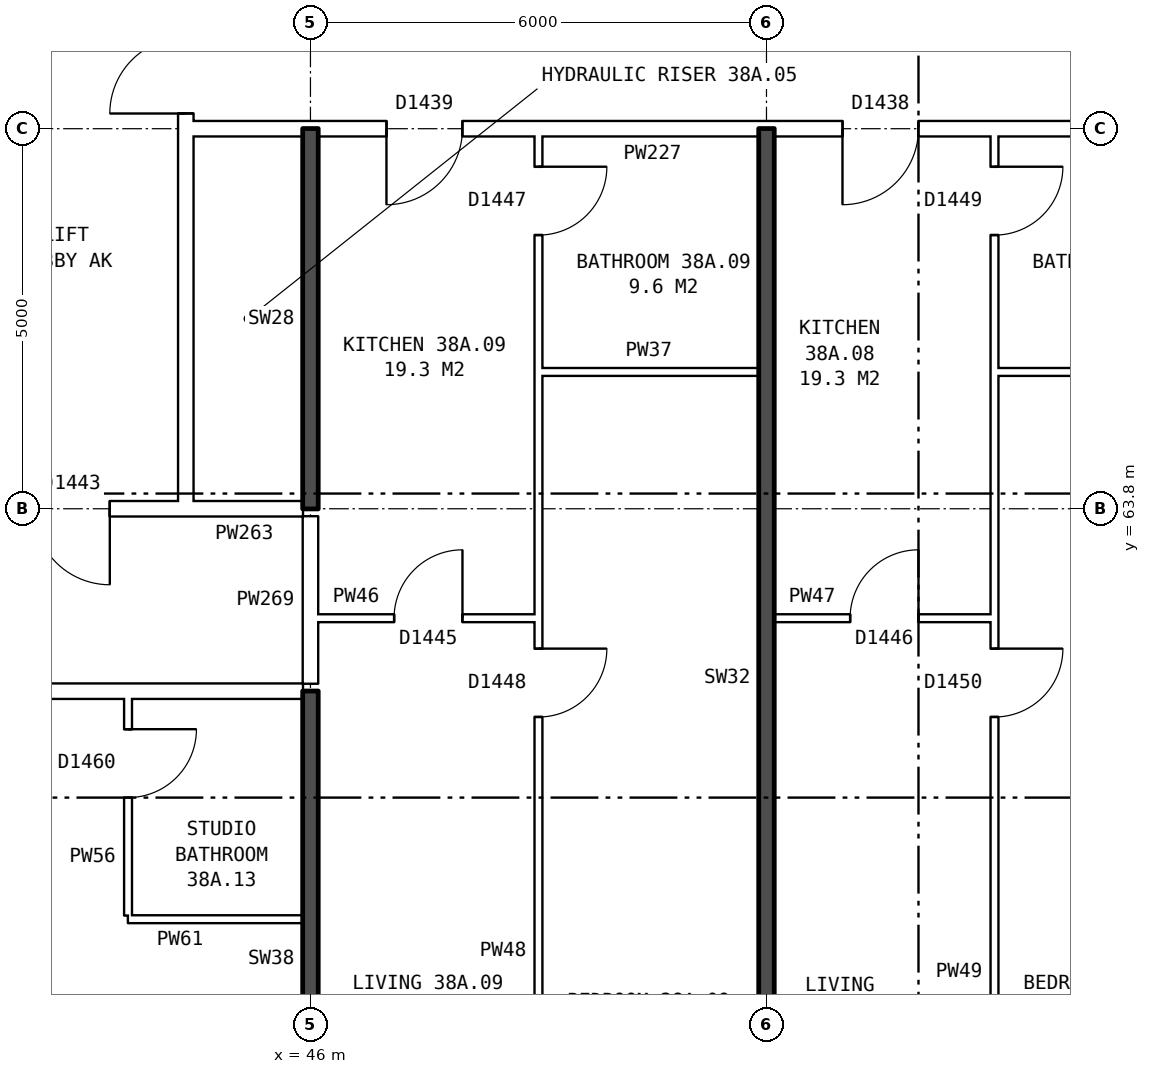
"""IFC4 building model, lengths in metres.
Left out: names, types, materials, properties, quantities, classifications, styles, units other than length and angle.
Written with IfcOpenShell. Run it as: python <this file> out.ifc"""

import sys

from ifc_helpers import new_model, si_unit, direction, frame, frame_2d, origin, place, context, subcontext, project, spatial, rectangle, extrude, element, fill, save


model = new_model("IFC4")
c1 = context("Model", 3, precision=1e-05, world=origin(), true_north=direction((0.0, 1.0)))
c2 = subcontext(c1, "Body", "Model", "MODEL_VIEW")
j1 = project(units=[si_unit("LENGTHUNIT", "METRE"), si_unit("PLANEANGLEUNIT", "RADIAN")], contexts=[c1])
p1 = place(None, origin())
s1 = spatial("IfcSite", under=j1, at=p1, CompositionType="ELEMENT")
p2 = place(p1, origin())
s2 = spatial("IfcBuilding", under=s1, at=p2, CompositionType="ELEMENT")
p3 = place(p2, frame((0.0, 0.0, 136.1)))
s3 = spatial("IfcBuildingStorey", under=s2, at=p3, CompositionType="ELEMENT", Elevation=136.1)
p4 = place(p3, frame((44.36, 63.9, 0.0), z_axis=(0.0, 0.0, 1.0), x_axis=(0.0, 1.0, 0.0)))
e1 = element("IfcWall", 1, at=p4, inside=s3, PredefinedType="PARTITIONING", context=c2, shape_type="SweptSolid", body=[
    extrude(rectangle(XDim=12.2, YDim=0.2, at=frame_2d((6.1, 0.0))), origin(), (0.0, 0.0, 1.0), 2.85),
])
p5 = place(p4, frame((5.1, 0.0, 0.0)))
e2 = element("IfcOpeningElement", 2, at=p5, cuts=e1, PredefinedType="OPENING", context=c2, shape_type="SweptSolid", body=[
    extrude(rectangle(XDim=2.0, YDim=2.1, at=frame_2d((1.0, 1.05))), frame((0.0, 0.11, 0.0), z_axis=(0.0, -1.0, 0.0), x_axis=(1.0, 0.0, 0.0)), (0.0, 0.0, 1.0), 0.22),
])
p6 = place(p3, frame((43.6, 58.4, 0.0), z_axis=(0.0, 0.0, 1.0), x_axis=(1.0, 0.0, 0.0)))
e3 = element("IfcWall", 3, at=p6, inside=s3, PredefinedType="PARTITIONING", context=c2, shape_type="SweptSolid", body=[
    extrude(rectangle(XDim=2.3, YDim=0.1, at=frame_2d((1.15, 0.0))), origin(), (0.0, 0.0, 1.0), 2.85),
])
p7 = place(p3, frame((27.11, 61.4, 0.0), z_axis=(0.0, 0.0, 1.0), x_axis=(1.0, 0.0, 0.0)))
e4 = element("IfcWall", 4, at=p7, inside=s3, PredefinedType="PARTITIONING", context=c2, shape_type="SweptSolid", body=[
    extrude(rectangle(XDim=18.79, YDim=0.2, at=frame_2d((9.395, 0.0))), origin(), (0.0, 0.0, 1.0), 2.85),
])
p8 = place(p7, frame((14.19, 0.0, 0.0)))
e5 = element("IfcOpeningElement", 5, at=p8, cuts=e4, PredefinedType="OPENING", context=c2, shape_type="SweptSolid", body=[
    extrude(rectangle(XDim=1.0, YDim=2.1, at=frame_2d((0.5, 1.05))), frame((0.0, 0.11, 0.0), z_axis=(0.0, -1.0, 0.0), x_axis=(1.0, 0.0, 0.0)), (0.0, 0.0, 1.0), 0.22),
])
p9 = place(p7, frame((8.19, 0.0, 0.0)))
e6 = element("IfcOpeningElement", 6, at=p9, cuts=e4, PredefinedType="OPENING", context=c2, shape_type="SweptSolid", body=[
    extrude(rectangle(XDim=1.0, YDim=2.1, at=frame_2d((0.5, 1.05))), frame((0.0, 0.11, 0.0), z_axis=(0.0, -1.0, 0.0), x_axis=(1.0, 0.0, 0.0)), (0.0, 0.0, 1.0), 0.22),
])
p10 = place(p7, frame((4.59, 0.0, 0.0)))
e7 = element("IfcOpeningElement", 7, at=p10, cuts=e4, PredefinedType="OPENING", context=c2, shape_type="SweptSolid", body=[
    extrude(rectangle(XDim=1.0, YDim=2.1, at=frame_2d((0.5, 1.05))), frame((0.0, 0.11, 0.0), z_axis=(0.0, -1.0, 0.0), x_axis=(1.0, 0.0, 0.0)), (0.0, 0.0, 1.0), 0.22),
])
p11 = place(p3, frame((46.1, 62.36, 0.0), z_axis=(0.0, 0.0, 1.0), x_axis=(1.0, 0.0, 0.0)))
e8 = element("IfcWall", 8, at=p11, inside=s3, PredefinedType="PARTITIONING", context=c2, shape_type="SweptSolid", body=[
    extrude(rectangle(XDim=2.9, YDim=0.1, at=frame_2d((1.45, 0.0))), origin(), (0.0, 0.0, 1.0), 2.85),
])
p12 = place(p11, frame((1.0, 0.0, 0.0)))
e9 = element("IfcOpeningElement", 9, at=p12, cuts=e8, PredefinedType="OPENING", context=c2, shape_type="SweptSolid", body=[
    extrude(rectangle(XDim=0.9, YDim=2.1, at=frame_2d((0.45, 1.05))), frame((0.0, 0.06, 0.0), z_axis=(0.0, -1.0, 0.0), x_axis=(1.0, 0.0, 0.0)), (0.0, 0.0, 1.0), 0.12),
])
p13 = place(p3, frame((52.1, 62.36, 0.0), z_axis=(0.0, 0.0, 1.0), x_axis=(1.0, 0.0, 0.0)))
e10 = element("IfcWall", 10, at=p13, inside=s3, PredefinedType="PARTITIONING", context=c2, shape_type="SweptSolid", body=[
    extrude(rectangle(XDim=2.9, YDim=0.1, at=frame_2d((1.45, 0.0))), origin(), (0.0, 0.0, 1.0), 2.85),
])
p14 = place(p13, frame((1.0, 0.0, 0.0)))
e11 = element("IfcOpeningElement", 11, at=p14, cuts=e10, PredefinedType="OPENING", context=c2, shape_type="SweptSolid", body=[
    extrude(rectangle(XDim=0.9, YDim=2.1, at=frame_2d((0.45, 1.05))), frame((0.0, 0.06, 0.0), z_axis=(0.0, -1.0, 0.0), x_axis=(1.0, 0.0, 0.0)), (0.0, 0.0, 1.0), 0.12),
])
p15 = place(p3, frame((41.36, 63.8, 0.0), z_axis=(0.0, 0.0, 1.0), x_axis=(1.0, 0.0, 0.0)))
e12 = element("IfcWall", 12, at=p15, inside=s3, PredefinedType="PARTITIONING", context=c2, shape_type="SweptSolid", body=[
    extrude(rectangle(XDim=3.0, YDim=0.2, at=frame_2d((1.5, 0.0))), origin(), (0.0, 0.0, 1.0), 2.85),
])
p16 = place(p15, frame((1.0, 0.0, 0.0)))
e13 = element("IfcOpeningElement", 13, at=p16, cuts=e12, PredefinedType="OPENING", context=c2, shape_type="SweptSolid", body=[
    extrude(rectangle(XDim=1.0, YDim=2.1, at=frame_2d((0.5, 1.05))), frame((0.0, 0.11, 0.0), z_axis=(0.0, -1.0, 0.0), x_axis=(1.0, 0.0, 0.0)), (0.0, 0.0, 1.0), 0.22),
])
p17 = place(p3, frame((44.36, 63.8, 0.0), z_axis=(0.0, 0.0, 1.0), x_axis=(1.0, 0.0, 0.0)))
e14 = element("IfcWall", 14, at=p17, inside=s3, PredefinedType="PARTITIONING", context=c2, shape_type="SweptSolid", body=[
    extrude(rectangle(XDim=1.54, YDim=0.2, at=frame_2d((0.77, 0.0))), origin(), (0.0, 0.0, 1.0), 2.85),
])
for number, where, z_axis, x_axis in (
    (15, (49.0, 65.6, 0.0), (0.0, 0.0, 1.0), (1.0, 0.0, 0.0)),
    (16, (55.0, 65.6, 0.0), (0.0, 0.0, 1.0), (1.0, 0.0, 0.0)),
):
    element("IfcWall", number, at=place(p3, frame(where, z_axis=z_axis, x_axis=x_axis)), inside=s3, PredefinedType="PARTITIONING", context=c2, shape_type="SweptSolid", body=[
        extrude(rectangle(XDim=2.9, YDim=0.1, at=frame_2d((1.45, 0.0))), origin(), (0.0, 0.0, 1.0), 2.85),
    ])
p18 = place(p3, frame((44.36, 68.8, 0.0), z_axis=(0.0, 0.0, 1.0), x_axis=(1.0, 0.0, 0.0)))
e17 = element("IfcWall", 17, at=p18, inside=s3, PredefinedType="PARTITIONING", context=c2, shape_type="SweptSolid", body=[
    extrude(rectangle(XDim=19.28, YDim=0.2, at=frame_2d((9.64, 0.0))), origin(), (0.0, 0.0, 1.0), 2.85),
])
p19 = place(p18, frame((14.64, 0.0, 0.0)))
e18 = element("IfcOpeningElement", 18, at=p19, cuts=e17, PredefinedType="OPENING", context=c2, shape_type="SweptSolid", body=[
    extrude(rectangle(XDim=1.0, YDim=2.1, at=frame_2d((0.5, 1.05))), frame((0.0, 0.11, 0.0), z_axis=(0.0, -1.0, 0.0), x_axis=(1.0, 0.0, 0.0)), (0.0, 0.0, 1.0), 0.22),
])
p20 = place(p18, frame((8.64, 0.0, 0.0)))
e19 = element("IfcOpeningElement", 19, at=p20, cuts=e17, PredefinedType="OPENING", context=c2, shape_type="SweptSolid", body=[
    extrude(rectangle(XDim=1.0, YDim=2.1, at=frame_2d((0.5, 1.05))), frame((0.0, 0.11, 0.0), z_axis=(0.0, -1.0, 0.0), x_axis=(1.0, 0.0, 0.0)), (0.0, 0.0, 1.0), 0.22),
])
p21 = place(p18, frame((2.64, 0.0, 0.0)))
e20 = element("IfcOpeningElement", 20, at=p21, cuts=e17, PredefinedType="OPENING", context=c2, shape_type="SweptSolid", body=[
    extrude(rectangle(XDim=1.0, YDim=2.1, at=frame_2d((0.5, 1.05))), frame((0.0, 0.11, 0.0), z_axis=(0.0, -1.0, 0.0), x_axis=(1.0, 0.0, 0.0)), (0.0, 0.0, 1.0), 0.22),
])
p22 = place(p3, frame((43.6, 58.45, 0.0), z_axis=(0.0, 0.0, 1.0), x_axis=(0.0, 1.0, 0.0)))
e21 = element("IfcWall", 21, at=p22, inside=s3, PredefinedType="PARTITIONING", context=c2, shape_type="SweptSolid", body=[
    extrude(rectangle(XDim=2.85, YDim=0.1, at=frame_2d((1.425, 0.0))), origin(), (0.0, 0.0, 1.0), 2.85),
])
p23 = place(p22, frame((1.55, 0.0, 0.0)))
e22 = element("IfcOpeningElement", 22, at=p23, cuts=e21, PredefinedType="OPENING", context=c2, shape_type="SweptSolid", body=[
    extrude(rectangle(XDim=0.9, YDim=2.1, at=frame_2d((0.45, 1.05))), frame((0.0, 0.06, 0.0), z_axis=(0.0, -1.0, 0.0), x_axis=(1.0, 0.0, 0.0)), (0.0, 0.0, 1.0), 0.12),
])
p24 = place(p3, frame((46.0, 54.36, 0.0), z_axis=(0.0, 0.0, 1.0), x_axis=(0.0, 1.0, 0.0)))
e23 = element("IfcWall", 23, at=p24, inside=s3, PredefinedType="SOLIDWALL", context=c2, shape_type="SweptSolid", body=[
    extrude(rectangle(XDim=7.04, YDim=0.2, at=frame_2d((3.52, 0.0))), origin(), (0.0, 0.0, 1.0), 2.85),
])
p25 = place(p3, frame((46.0, 61.5, 0.0), z_axis=(0.0, 0.0, 1.0), x_axis=(0.0, 1.0, 0.0)))
e24 = element("IfcWall", 24, at=p25, inside=s3, PredefinedType="PARTITIONING", context=c2, shape_type="SweptSolid", body=[
    extrude(rectangle(XDim=2.2, YDim=0.2, at=frame_2d((1.1, 0.0))), origin(), (0.0, 0.0, 1.0), 2.85),
])
p26 = place(p3, frame((46.0, 63.8, 0.0), z_axis=(0.0, 0.0, 1.0), x_axis=(0.0, 1.0, 0.0)))
e25 = element("IfcWall", 25, at=p26, inside=s3, PredefinedType="SOLIDWALL", context=c2, shape_type="SweptSolid", body=[
    extrude(rectangle(XDim=5.0, YDim=0.2, at=frame_2d((2.5, 0.0))), origin(), (0.0, 0.0, 1.0), 2.85),
])
p27 = place(p3, frame((49.0, 54.36, 0.0), z_axis=(0.0, 0.0, 1.0), x_axis=(0.0, 1.0, 0.0)))
e26 = element("IfcWall", 26, at=p27, inside=s3, PredefinedType="PARTITIONING", context=c2, shape_type="SweptSolid", body=[
    extrude(rectangle(XDim=14.34, YDim=0.1, at=frame_2d((7.17, 0.0))), origin(), (0.0, 0.0, 1.0), 2.85),
])
p28 = place(p27, frame((6.7, 0.0, 0.0)))
e27 = element("IfcOpeningElement", 27, at=p28, cuts=e26, PredefinedType="OPENING", context=c2, shape_type="SweptSolid", body=[
    extrude(rectangle(XDim=0.9, YDim=2.1, at=frame_2d((0.45, 1.05))), frame((0.0, 0.06, 0.0), z_axis=(0.0, -1.0, 0.0), x_axis=(1.0, 0.0, 0.0)), (0.0, 0.0, 1.0), 0.12),
])
p29 = place(p27, frame((13.04, 0.0, 0.0)))
e28 = element("IfcOpeningElement", 28, at=p29, cuts=e26, PredefinedType="OPENING", context=c2, shape_type="SweptSolid", body=[
    extrude(rectangle(XDim=0.9, YDim=2.1, at=frame_2d((0.45, 1.05))), frame((0.0, 0.06, 0.0), z_axis=(0.0, -1.0, 0.0), x_axis=(1.0, 0.0, 0.0)), (0.0, 0.0, 1.0), 0.12),
])
p30 = place(p3, frame((52.0, 54.36, 0.0), z_axis=(0.0, 0.0, 1.0), x_axis=(0.0, 1.0, 0.0)))
e29 = element("IfcWall", 29, at=p30, inside=s3, PredefinedType="SOLIDWALL", context=c2, shape_type="SweptSolid", body=[
    extrude(rectangle(XDim=14.44, YDim=0.2, at=frame_2d((7.22, 0.0))), origin(), (0.0, 0.0, 1.0), 2.85),
])
p31 = place(p3, frame((55.0, 54.36, 0.0), z_axis=(0.0, 0.0, 1.0), x_axis=(0.0, 1.0, 0.0)))
e30 = element("IfcWall", 30, at=p31, inside=s3, PredefinedType="PARTITIONING", context=c2, shape_type="SweptSolid", body=[
    extrude(rectangle(XDim=14.34, YDim=0.1, at=frame_2d((7.17, 0.0))), origin(), (0.0, 0.0, 1.0), 2.85),
])
p32 = place(p31, frame((6.7, 0.0, 0.0)))
e31 = element("IfcOpeningElement", 31, at=p32, cuts=e30, PredefinedType="OPENING", context=c2, shape_type="SweptSolid", body=[
    extrude(rectangle(XDim=0.9, YDim=2.1, at=frame_2d((0.45, 1.05))), frame((0.0, 0.06, 0.0), z_axis=(0.0, -1.0, 0.0), x_axis=(1.0, 0.0, 0.0)), (0.0, 0.0, 1.0), 0.12),
])
p33 = place(p31, frame((13.04, 0.0, 0.0)))
e32 = element("IfcOpeningElement", 32, at=p33, cuts=e30, PredefinedType="OPENING", context=c2, shape_type="SweptSolid", body=[
    extrude(rectangle(XDim=0.9, YDim=2.1, at=frame_2d((0.45, 1.05))), frame((0.0, 0.06, 0.0), z_axis=(0.0, -1.0, 0.0), x_axis=(1.0, 0.0, 0.0)), (0.0, 0.0, 1.0), 0.12),
])
p34 = place(p5, origin())
e33 = element("IfcDoor", 33, at=p34, inside=s3, OperationType="DOUBLE_DOOR_SINGLE_SWING", PredefinedType="DOOR", context=c2, shape_type="SweptSolid", body=[
    extrude(rectangle(XDim=2.0, YDim=2.1, at=frame_2d((1.0, 1.05))), frame((0.0, 0.025, 0.0), z_axis=(0.0, -1.0, 0.0), x_axis=(1.0, 0.0, 0.0)), (0.0, 0.0, 1.0), 0.05),
])
fill(e2, e33)
p35 = place(p16, frame((1.0, 0.0, 0.0), z_axis=(0.0, 0.0, 1.0), x_axis=(-1.0, 0.0, 0.0)))
e34 = element("IfcDoor", 34, at=p35, inside=s3, OperationType="SINGLE_SWING_LEFT", PredefinedType="DOOR", context=c2, shape_type="SweptSolid", body=[
    extrude(rectangle(XDim=1.0, YDim=2.1, at=frame_2d((0.5, 1.05))), frame((0.0, 0.025, 0.0), z_axis=(0.0, -1.0, 0.0), x_axis=(1.0, 0.0, 0.0)), (0.0, 0.0, 1.0), 0.05),
])
fill(e13, e34)
p36 = place(p32, frame((0.9, 0.0, 0.0), z_axis=(0.0, 0.0, 1.0), x_axis=(-1.0, 0.0, 0.0)))
e35 = element("IfcDoor", 35, at=p36, inside=s3, OperationType="SINGLE_SWING_LEFT", PredefinedType="DOOR", context=c2, shape_type="SweptSolid", body=[
    extrude(rectangle(XDim=0.9, YDim=2.1, at=frame_2d((0.45, 1.05))), frame((0.0, 0.025, 0.0), z_axis=(0.0, -1.0, 0.0), x_axis=(1.0, 0.0, 0.0)), (0.0, 0.0, 1.0), 0.05),
])
fill(e31, e35)
p37 = place(p20, frame((1.0, 0.0, 0.0), z_axis=(0.0, 0.0, 1.0), x_axis=(-1.0, 0.0, 0.0)))
e36 = element("IfcDoor", 36, at=p37, inside=s3, OperationType="SINGLE_SWING_RIGHT", PredefinedType="DOOR", context=c2, shape_type="SweptSolid", body=[
    extrude(rectangle(XDim=1.0, YDim=2.1, at=frame_2d((0.5, 1.05))), frame((0.0, 0.025, 0.0), z_axis=(0.0, -1.0, 0.0), x_axis=(1.0, 0.0, 0.0)), (0.0, 0.0, 1.0), 0.05),
])
fill(e19, e36)
p38 = place(p14, origin())
e37 = element("IfcDoor", 37, at=p38, inside=s3, OperationType="SINGLE_SWING_RIGHT", PredefinedType="DOOR", context=c2, shape_type="SweptSolid", body=[
    extrude(rectangle(XDim=0.9, YDim=2.1, at=frame_2d((0.45, 1.05))), frame((0.0, 0.025, 0.0), z_axis=(0.0, -1.0, 0.0), x_axis=(1.0, 0.0, 0.0)), (0.0, 0.0, 1.0), 0.05),
])
fill(e11, e37)
p39 = place(p33, frame((0.9, 0.0, 0.0), z_axis=(0.0, 0.0, 1.0), x_axis=(-1.0, 0.0, 0.0)))
e38 = element("IfcDoor", 38, at=p39, inside=s3, OperationType="SINGLE_SWING_LEFT", PredefinedType="DOOR", context=c2, shape_type="SweptSolid", body=[
    extrude(rectangle(XDim=0.9, YDim=2.1, at=frame_2d((0.45, 1.05))), frame((0.0, 0.025, 0.0), z_axis=(0.0, -1.0, 0.0), x_axis=(1.0, 0.0, 0.0)), (0.0, 0.0, 1.0), 0.05),
])
fill(e32, e38)
p40 = place(p28, frame((0.9, 0.0, 0.0), z_axis=(0.0, 0.0, 1.0), x_axis=(-1.0, 0.0, 0.0)))
e39 = element("IfcDoor", 39, at=p40, inside=s3, OperationType="SINGLE_SWING_LEFT", PredefinedType="DOOR", context=c2, shape_type="SweptSolid", body=[
    extrude(rectangle(XDim=0.9, YDim=2.1, at=frame_2d((0.45, 1.05))), frame((0.0, 0.025, 0.0), z_axis=(0.0, -1.0, 0.0), x_axis=(1.0, 0.0, 0.0)), (0.0, 0.0, 1.0), 0.05),
])
fill(e27, e39)
p41 = place(p21, frame((1.0, 0.0, 0.0), z_axis=(0.0, 0.0, 1.0), x_axis=(-1.0, 0.0, 0.0)))
e40 = element("IfcDoor", 40, at=p41, inside=s3, OperationType="SINGLE_SWING_RIGHT", PredefinedType="DOOR", context=c2, shape_type="SweptSolid", body=[
    extrude(rectangle(XDim=1.0, YDim=2.1, at=frame_2d((0.5, 1.05))), frame((0.0, 0.025, 0.0), z_axis=(0.0, -1.0, 0.0), x_axis=(1.0, 0.0, 0.0)), (0.0, 0.0, 1.0), 0.05),
])
fill(e20, e40)
p42 = place(p12, origin())
e41 = element("IfcDoor", 41, at=p42, inside=s3, OperationType="SINGLE_SWING_RIGHT", PredefinedType="DOOR", context=c2, shape_type="SweptSolid", body=[
    extrude(rectangle(XDim=0.9, YDim=2.1, at=frame_2d((0.45, 1.05))), frame((0.0, 0.025, 0.0), z_axis=(0.0, -1.0, 0.0), x_axis=(1.0, 0.0, 0.0)), (0.0, 0.0, 1.0), 0.05),
])
fill(e9, e41)
p43 = place(p29, frame((0.9, 0.0, 0.0), z_axis=(0.0, 0.0, 1.0), x_axis=(-1.0, 0.0, 0.0)))
e42 = element("IfcDoor", 42, at=p43, inside=s3, OperationType="SINGLE_SWING_LEFT", PredefinedType="DOOR", context=c2, shape_type="SweptSolid", body=[
    extrude(rectangle(XDim=0.9, YDim=2.1, at=frame_2d((0.45, 1.05))), frame((0.0, 0.025, 0.0), z_axis=(0.0, -1.0, 0.0), x_axis=(1.0, 0.0, 0.0)), (0.0, 0.0, 1.0), 0.05),
])
fill(e28, e42)
p44 = place(p23, frame((0.9, 0.0, 0.0), z_axis=(0.0, 0.0, 1.0), x_axis=(-1.0, 0.0, 0.0)))
e43 = element("IfcDoor", 43, at=p44, inside=s3, OperationType="SINGLE_SWING_LEFT", PredefinedType="DOOR", context=c2, shape_type="SweptSolid", body=[
    extrude(rectangle(XDim=0.9, YDim=2.1, at=frame_2d((0.45, 1.05))), frame((0.0, 0.025, 0.0), z_axis=(0.0, -1.0, 0.0), x_axis=(1.0, 0.0, 0.0)), (0.0, 0.0, 1.0), 0.05),
])
fill(e22, e43)
save(model, sys.argv[1])
